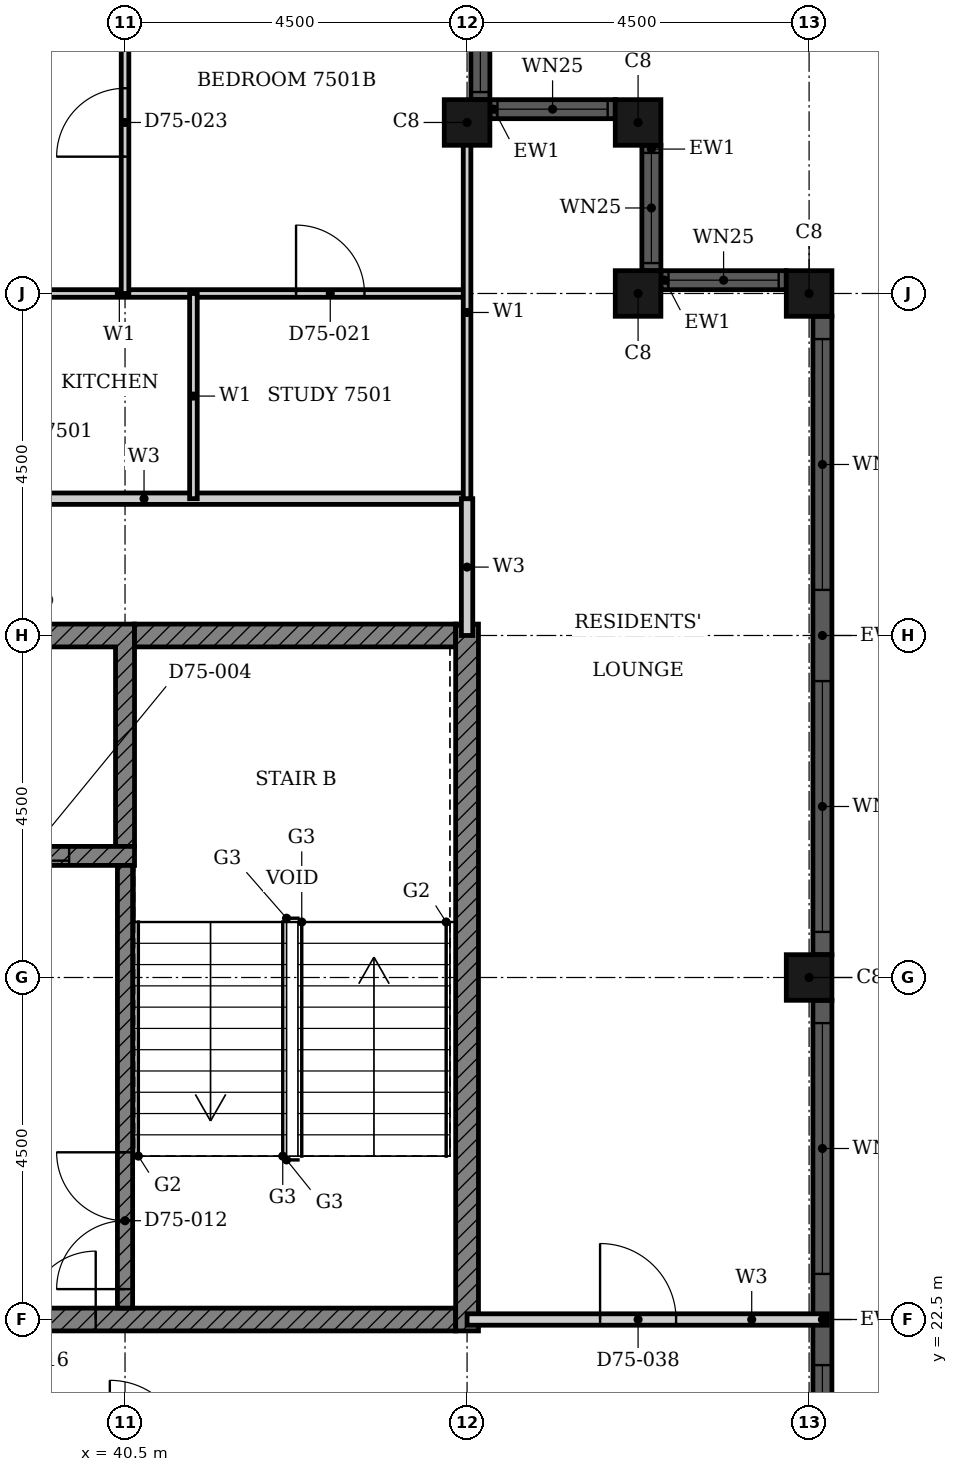
"""IFC4 building model, lengths in metres.
Left out: names, types, materials, properties, quantities, classifications, styles, units other than length and angle.
Written with IfcOpenShell. Run it as: python <this file> out.ifc"""

import sys

from ifc_helpers import new_model, si_unit, direction, frame, frame_2d, origin, origin_2d, place, context, subcontext, project, spatial, polyline, rectangle, hollow_rectangle, outline, extrude, element, fill, save


model = new_model("IFC4")
c1 = context("Model", 3, precision=1e-05, world=origin(), true_north=direction((0.0, 1.0)))
c2 = subcontext(c1, "Body", "Model", "MODEL_VIEW")
j1 = project(units=[si_unit("LENGTHUNIT", "METRE"), si_unit("PLANEANGLEUNIT", "RADIAN")], contexts=[c1])
p1 = place(None, origin())
s1 = spatial("IfcSite", under=j1, at=p1, CompositionType="ELEMENT")
p2 = place(p1, origin())
s2 = spatial("IfcBuilding", under=s1, at=p2, CompositionType="ELEMENT")
p3 = place(p2, frame((0.0, 0.0, 294.5)))
s3 = spatial("IfcBuildingStorey", under=s2, at=p3, CompositionType="ELEMENT", Elevation=294.5)
for number, where, z_axis, x_axis in (
    (1, (49.5, 27.0, 0.0), (0.0, 0.0, 1.0), (1.0, 0.0, 0.0)),
    (2, (49.5, 36.0, 0.0), (0.0, 0.0, 1.0), (1.0, 0.0, 0.0)),
    (3, (47.25, 36.0, 0.0), (0.0, 0.0, 1.0), (1.0, 0.0, 0.0)),
    (4, (47.25, 38.25, 0.0), (0.0, 0.0, 1.0), (1.0, 0.0, 0.0)),
    (5, (45.0, 38.25, 0.0), (0.0, 0.0, 1.0), (1.0, 0.0, 0.0)),
):
    element("IfcColumn", number, at=place(p3, frame(where, z_axis=z_axis, x_axis=x_axis)), inside=s3, PredefinedType="COLUMN", context=c2, shape_type="SweptSolid", body=[
        extrude(hollow_rectangle(XDim=0.6, YDim=0.6, WallThickness=0.02, at=origin_2d()), origin(), (0.0, 0.0, 1.0), 3.7),
    ])
p4 = place(p3, frame((49.675, 18.3, 0.0), z_axis=(0.0, 0.0, 1.0), x_axis=(0.0, 1.0, 0.0)))
e6 = element("IfcWall", 6, at=p4, inside=s3, PredefinedType="SOLIDWALL", context=c2, shape_type="SweptSolid", body=[
    extrude(rectangle(XDim=8.4, YDim=0.25, at=frame_2d((4.2, 0.0))), origin(), (0.0, 0.0, 1.0), 3.7),
])
p5 = place(p4, frame((0.3, 0.0, 0.45)))
e7 = element("IfcOpeningElement", 7, at=p5, cuts=e6, PredefinedType="OPENING", context=c2, shape_type="SweptSolid", body=[
    extrude(rectangle(XDim=3.3, YDim=2.3, at=frame_2d((1.65, 1.15))), frame((0.0, 0.135, 0.0), z_axis=(0.0, -1.0, 0.0), x_axis=(1.0, 0.0, 0.0)), (0.0, 0.0, 1.0), 0.27),
])
p6 = place(p4, frame((4.8, 0.0, 0.45)))
e8 = element("IfcOpeningElement", 8, at=p6, cuts=e6, PredefinedType="OPENING", context=c2, shape_type="SweptSolid", body=[
    extrude(rectangle(XDim=3.3, YDim=2.3, at=frame_2d((1.65, 1.15))), frame((0.0, 0.135, 0.0), z_axis=(0.0, -1.0, 0.0), x_axis=(1.0, 0.0, 0.0)), (0.0, 0.0, 1.0), 0.27),
])
p7 = place(p3, frame((49.675, 27.3, 0.0), z_axis=(0.0, 0.0, 1.0), x_axis=(0.0, 1.0, 0.0)))
e9 = element("IfcWall", 9, at=p7, inside=s3, PredefinedType="SOLIDWALL", context=c2, shape_type="SweptSolid", body=[
    extrude(rectangle(XDim=8.4, YDim=0.25, at=frame_2d((4.2, 0.0))), origin(), (0.0, 0.0, 1.0), 3.7),
])
p8 = place(p7, frame((0.3, 0.0, 0.45)))
e10 = element("IfcOpeningElement", 10, at=p8, cuts=e9, PredefinedType="OPENING", context=c2, shape_type="SweptSolid", body=[
    extrude(rectangle(XDim=3.3, YDim=2.3, at=frame_2d((1.65, 1.15))), frame((0.0, 0.135, 0.0), z_axis=(0.0, -1.0, 0.0), x_axis=(1.0, 0.0, 0.0)), (0.0, 0.0, 1.0), 0.27),
])
p9 = place(p7, frame((4.8, 0.0, 0.45)))
e11 = element("IfcOpeningElement", 11, at=p9, cuts=e9, PredefinedType="OPENING", context=c2, shape_type="SweptSolid", body=[
    extrude(rectangle(XDim=3.3, YDim=2.3, at=frame_2d((1.65, 1.15))), frame((0.0, 0.135, 0.0), z_axis=(0.0, -1.0, 0.0), x_axis=(1.0, 0.0, 0.0)), (0.0, 0.0, 1.0), 0.27),
])
p10 = place(p3, frame((49.2, 36.175, 0.0), z_axis=(0.0, 0.0, 1.0), x_axis=(-1.0, 0.0, 0.0)))
e12 = element("IfcWall", 12, at=p10, inside=s3, PredefinedType="SOLIDWALL", context=c2, shape_type="SweptSolid", body=[
    extrude(rectangle(XDim=1.65, YDim=0.25, at=frame_2d((0.825, 0.0))), origin(), (0.0, 0.0, 1.0), 3.7),
])
p11 = place(p10, frame((0.1, 0.0, 0.9)))
e13 = element("IfcOpeningElement", 13, at=p11, cuts=e12, PredefinedType="OPENING", context=c2, shape_type="SweptSolid", body=[
    extrude(rectangle(XDim=1.45, YDim=1.85, at=frame_2d((0.725, 0.925))), frame((0.0, 0.135, 0.0), z_axis=(0.0, -1.0, 0.0), x_axis=(1.0, 0.0, 0.0)), (0.0, 0.0, 1.0), 0.27),
])
p12 = place(p3, frame((47.425, 36.3, 0.0), z_axis=(0.0, 0.0, 1.0), x_axis=(0.0, 1.0, 0.0)))
e14 = element("IfcWall", 14, at=p12, inside=s3, PredefinedType="SOLIDWALL", context=c2, shape_type="SweptSolid", body=[
    extrude(rectangle(XDim=1.65, YDim=0.25, at=frame_2d((0.825, 0.0))), origin(), (0.0, 0.0, 1.0), 3.7),
])
p13 = place(p12, frame((0.1, 0.0, 0.9)))
e15 = element("IfcOpeningElement", 15, at=p13, cuts=e14, PredefinedType="OPENING", context=c2, shape_type="SweptSolid", body=[
    extrude(rectangle(XDim=1.45, YDim=1.85, at=frame_2d((0.725, 0.925))), frame((0.0, 0.135, 0.0), z_axis=(0.0, -1.0, 0.0), x_axis=(1.0, 0.0, 0.0)), (0.0, 0.0, 1.0), 0.27),
])
p14 = place(p3, frame((46.95, 38.425, 0.0), z_axis=(0.0, 0.0, 1.0), x_axis=(-1.0, 0.0, 0.0)))
e16 = element("IfcWall", 16, at=p14, inside=s3, PredefinedType="SOLIDWALL", context=c2, shape_type="SweptSolid", body=[
    extrude(rectangle(XDim=1.65, YDim=0.25, at=frame_2d((0.825, 0.0))), origin(), (0.0, 0.0, 1.0), 3.7),
])
p15 = place(p14, frame((0.1, 0.0, 0.9)))
e17 = element("IfcOpeningElement", 17, at=p15, cuts=e16, PredefinedType="OPENING", context=c2, shape_type="SweptSolid", body=[
    extrude(rectangle(XDim=1.45, YDim=1.85, at=frame_2d((0.725, 0.925))), frame((0.0, 0.135, 0.0), z_axis=(0.0, -1.0, 0.0), x_axis=(1.0, 0.0, 0.0)), (0.0, 0.0, 1.0), 0.27),
])
p16 = place(p3, frame((45.175, 38.55, 0.0), z_axis=(0.0, 0.0, 1.0), x_axis=(0.0, 1.0, 0.0)))
e18 = element("IfcWall", 18, at=p16, inside=s3, PredefinedType="SOLIDWALL", context=c2, shape_type="SweptSolid", body=[
    extrude(rectangle(XDim=1.65, YDim=0.25, at=frame_2d((0.825, 0.0))), origin(), (0.0, 0.0, 1.0), 3.7),
])
p17 = place(p16, frame((0.1, 0.0, 0.9)))
e19 = element("IfcOpeningElement", 19, at=p17, cuts=e18, PredefinedType="OPENING", context=c2, shape_type="SweptSolid", body=[
    extrude(rectangle(XDim=1.45, YDim=1.85, at=frame_2d((0.725, 0.925))), frame((0.0, 0.135, 0.0), z_axis=(0.0, -1.0, 0.0), x_axis=(1.0, 0.0, 0.0)), (0.0, 0.0, 1.0), 0.27),
])
p18 = place(p3, origin())
e20 = element("IfcWall", 20, at=p18, inside=s3, PredefinedType="SHEAR", context=c2, shape_type="SweptSolid", body=[
    extrude(outline(polyline([(37.803, 28.725), (38.053, 28.725), (38.053, 31.35), (40.375, 31.35), (40.375, 28.725), (40.625, 28.725), (40.625, 31.65), (37.803, 31.65), (37.803, 28.725)])), origin(), (0.0, 0.0, 1.0), 3.4),
])
p19 = place(p3, frame((30.339, 22.5, 0.0), z_axis=(0.0, 0.0, 1.0), x_axis=(1.0, 0.0, 0.0)))
e21 = element("IfcWall", 21, at=p19, inside=s3, PredefinedType="SHEAR", context=c2, shape_type="SweptSolid", body=[
    extrude(rectangle(XDim=14.511, YDim=0.3, at=frame_2d((7.255, 0.0))), origin(), (0.0, 0.0, 1.0), 3.4),
])
p20 = place(p19, frame((7.975, 0.0, 0.0)))
e22 = element("IfcOpeningElement", 22, at=p20, cuts=e21, PredefinedType="OPENING", context=c2, shape_type="SweptSolid", body=[
    extrude(rectangle(XDim=1.8, YDim=2.1, at=frame_2d((0.9, 1.05))), frame((0.0, 0.16, 0.0), z_axis=(0.0, -1.0, 0.0), x_axis=(1.0, 0.0, 0.0)), (0.0, 0.0, 1.0), 0.32),
])
p21 = place(p3, frame((40.625, 31.5, 0.0), z_axis=(0.0, 0.0, 1.0), x_axis=(1.0, 0.0, 0.0)))
e23 = element("IfcWall", 23, at=p21, inside=s3, PredefinedType="SHEAR", context=c2, shape_type="SweptSolid", body=[
    extrude(rectangle(XDim=4.225, YDim=0.3, at=frame_2d((2.113, 0.0))), origin(), (0.0, 0.0, 1.0), 3.4),
])
p22 = place(p3, frame((45.0, 22.35, 0.0), z_axis=(0.0, 0.0, 1.0), x_axis=(0.0, 1.0, 0.0)))
e24 = element("IfcWall", 24, at=p22, inside=s3, PredefinedType="SHEAR", context=c2, shape_type="SweptSolid", body=[
    extrude(rectangle(XDim=9.3, YDim=0.3, at=frame_2d((4.65, 0.0))), origin(), (0.0, 0.0, 1.0), 3.4),
])
p23 = place(p3, frame((24.947, 28.6, 0.0), z_axis=(0.0, 0.0, 1.0), x_axis=(1.0, 0.0, 0.0)))
e25 = element("IfcWall", 25, at=p23, inside=s3, PredefinedType="SHEAR", context=c2, shape_type="SweptSolid", body=[
    extrude(rectangle(XDim=15.678, YDim=0.25, at=frame_2d((7.839, 0.0))), origin(), (0.0, 0.0, 1.0), 3.4),
])
p24 = place(p23, frame((3.432, 0.0, 0.0)))
e26 = element("IfcOpeningElement", 26, at=p24, cuts=e25, PredefinedType="OPENING", context=c2, shape_type="SweptSolid", body=[
    extrude(rectangle(XDim=1.1, YDim=2.1, at=frame_2d((0.55, 1.05))), frame((0.0, 0.135, 0.0), z_axis=(0.0, -1.0, 0.0), x_axis=(1.0, 0.0, 0.0)), (0.0, 0.0, 1.0), 0.27),
])
p25 = place(p23, frame((13.718, 0.0, 0.0)))
e27 = element("IfcOpeningElement", 27, at=p25, cuts=e25, PredefinedType="OPENING", context=c2, shape_type="SweptSolid", body=[
    extrude(rectangle(XDim=1.1, YDim=2.1, at=frame_2d((0.55, 1.05))), frame((0.0, 0.135, 0.0), z_axis=(0.0, -1.0, 0.0), x_axis=(1.0, 0.0, 0.0)), (0.0, 0.0, 1.0), 0.27),
])
p26 = place(p23, frame((0.961, 0.0, 0.0)))
e28 = element("IfcOpeningElement", 28, at=p26, cuts=e25, PredefinedType="OPENING", context=c2, shape_type="SweptSolid", body=[
    extrude(rectangle(XDim=0.9, YDim=2.1, at=frame_2d((0.45, 1.05))), frame((0.0, 0.135, 0.0), z_axis=(0.0, -1.0, 0.0), x_axis=(1.0, 0.0, 0.0)), (0.0, 0.0, 1.0), 0.27),
])
p27 = place(p23, frame((7.389, 0.0, 0.0)))
e29 = element("IfcOpeningElement", 29, at=p27, cuts=e25, PredefinedType="OPENING", context=c2, shape_type="SweptSolid", body=[
    extrude(rectangle(XDim=0.9, YDim=2.1, at=frame_2d((0.45, 1.05))), frame((0.0, 0.135, 0.0), z_axis=(0.0, -1.0, 0.0), x_axis=(1.0, 0.0, 0.0)), (0.0, 0.0, 1.0), 0.27),
])
p28 = place(p23, frame((11.246, 0.0, 0.0)))
e30 = element("IfcOpeningElement", 30, at=p28, cuts=e25, PredefinedType="OPENING", context=c2, shape_type="SweptSolid", body=[
    extrude(rectangle(XDim=0.9, YDim=2.1, at=frame_2d((0.45, 1.05))), frame((0.0, 0.135, 0.0), z_axis=(0.0, -1.0, 0.0), x_axis=(1.0, 0.0, 0.0)), (0.0, 0.0, 1.0), 0.27),
])
p29 = place(p3, frame((40.5, 22.65, 0.0), z_axis=(0.0, 0.0, 1.0), x_axis=(0.0, 1.0, 0.0)))
e31 = element("IfcWall", 31, at=p29, inside=s3, PredefinedType="SHEAR", context=c2, shape_type="SweptSolid", body=[
    extrude(rectangle(XDim=5.825, YDim=0.2, at=frame_2d((2.913, 0.0))), origin(), (0.0, 0.0, 1.0), 3.4),
])
p30 = place(p29, frame((0.25, 0.0, 0.0)))
e32 = element("IfcOpeningElement", 32, at=p30, cuts=e31, PredefinedType="OPENING", context=c2, shape_type="SweptSolid", body=[
    extrude(rectangle(XDim=1.8, YDim=2.1, at=frame_2d((0.9, 1.05))), frame((0.0, 0.11, 0.0), z_axis=(0.0, -1.0, 0.0), x_axis=(1.0, 0.0, 0.0)), (0.0, 0.0, 1.0), 0.22),
])
p31 = place(p3, frame((45.0, 22.5, 0.0), z_axis=(0.0, 0.0, 1.0), x_axis=(1.0, 0.0, 0.0)))
e33 = element("IfcWall", 33, at=p31, inside=s3, PredefinedType="PARTITIONING", context=c2, shape_type="SweptSolid", body=[
    extrude(rectangle(XDim=4.74, YDim=0.15, at=frame_2d((2.37, 0.0))), origin(), (0.0, 0.0, 1.0), 3.4),
])
p32 = place(p31, frame((1.75, 0.0, 0.0)))
e34 = element("IfcOpeningElement", 34, at=p32, cuts=e33, PredefinedType="OPENING", context=c2, shape_type="SweptSolid", body=[
    extrude(rectangle(XDim=1.0, YDim=2.1, at=frame_2d((0.5, 1.05))), frame((0.0, 0.085, 0.0), z_axis=(0.0, -1.0, 0.0), x_axis=(1.0, 0.0, 0.0)), (0.0, 0.0, 1.0), 0.17),
])
p33 = place(p3, frame((33.9, 33.3, 0.0), z_axis=(0.0, 0.0, 1.0), x_axis=(1.0, 0.0, 0.0)))
e35 = element("IfcWall", 35, at=p33, inside=s3, PredefinedType="PARTITIONING", context=c2, shape_type="SweptSolid", body=[
    extrude(rectangle(XDim=11.1, YDim=0.15, at=frame_2d((5.55, 0.0))), origin(), (0.0, 0.0, 1.0), 3.4),
])
p34 = place(p33, frame((1.6, 0.0, 0.0)))
e36 = element("IfcOpeningElement", 36, at=p34, cuts=e35, PredefinedType="OPENING", context=c2, shape_type="SweptSolid", body=[
    extrude(rectangle(XDim=1.0, YDim=2.2, at=frame_2d((0.5, 1.1))), frame((0.0, 0.085, 0.0), z_axis=(0.0, -1.0, 0.0), x_axis=(1.0, 0.0, 0.0)), (0.0, 0.0, 1.0), 0.17),
])
p35 = place(p3, frame((45.0, 31.5, 0.0), z_axis=(0.0, 0.0, 1.0), x_axis=(0.0, 1.0, 0.0)))
e37 = element("IfcWall", 37, at=p35, inside=s3, PredefinedType="PARTITIONING", context=c2, shape_type="SweptSolid", body=[
    extrude(rectangle(XDim=1.8, YDim=0.15, at=frame_2d((0.9, 0.0))), origin(), (0.0, 0.0, 1.0), 3.4),
])
p36 = place(p3, frame((38.1, 36.0, 0.0), z_axis=(0.0, 0.0, 1.0), x_axis=(1.0, 0.0, 0.0)))
e38 = element("IfcWall", 38, at=p36, inside=s3, PredefinedType="PARTITIONING", context=c2, shape_type="SweptSolid", body=[
    extrude(rectangle(XDim=6.9, YDim=0.1, at=frame_2d((3.45, 0.0))), origin(), (0.0, 0.0, 1.0), 3.4),
])
p37 = place(p36, frame((4.65, 0.0, 0.0)))
e39 = element("IfcOpeningElement", 39, at=p37, cuts=e38, PredefinedType="OPENING", context=c2, shape_type="SweptSolid", body=[
    extrude(rectangle(XDim=0.9, YDim=2.1, at=frame_2d((0.45, 1.05))), frame((0.0, 0.06, 0.0), z_axis=(0.0, -1.0, 0.0), x_axis=(1.0, 0.0, 0.0)), (0.0, 0.0, 1.0), 0.12),
])
p38 = place(p3, frame((40.5, 36.0, 0.0), z_axis=(0.0, 0.0, 1.0), x_axis=(0.0, 1.0, 0.0)))
e40 = element("IfcWall", 40, at=p38, inside=s3, PredefinedType="PARTITIONING", context=c2, shape_type="SweptSolid", body=[
    extrude(rectangle(XDim=4.74, YDim=0.1, at=frame_2d((2.37, 0.0))), origin(), (0.0, 0.0, 1.0), 3.4),
])
p39 = place(p38, frame((1.8, 0.0, 0.0)))
e41 = element("IfcOpeningElement", 41, at=p39, cuts=e40, PredefinedType="OPENING", context=c2, shape_type="SweptSolid", body=[
    extrude(rectangle(XDim=0.9, YDim=2.1, at=frame_2d((0.45, 1.05))), frame((0.0, 0.06, 0.0), z_axis=(0.0, -1.0, 0.0), x_axis=(1.0, 0.0, 0.0)), (0.0, 0.0, 1.0), 0.12),
])
p40 = place(p3, frame((41.4, 33.3, 0.0), z_axis=(0.0, 0.0, 1.0), x_axis=(0.0, 1.0, 0.0)))
e42 = element("IfcWall", 42, at=p40, inside=s3, PredefinedType="PARTITIONING", context=c2, shape_type="SweptSolid", body=[
    extrude(rectangle(XDim=2.7, YDim=0.1, at=frame_2d((1.35, 0.0))), origin(), (0.0, 0.0, 1.0), 3.4),
])
p41 = place(p3, frame((45.0, 33.3, 0.0), z_axis=(0.0, 0.0, 1.0), x_axis=(0.0, 1.0, 0.0)))
e43 = element("IfcWall", 43, at=p41, inside=s3, PredefinedType="PARTITIONING", context=c2, shape_type="SweptSolid", body=[
    extrude(rectangle(XDim=4.9, YDim=0.1, at=frame_2d((2.45, 0.0))), origin(), (0.0, 0.0, 1.0), 3.4),
])
p42 = place(p5, origin())
e44 = element("IfcWindow", 44, at=p42, inside=s3, PartitioningType="SINGLE_PANEL", PredefinedType="WINDOW", context=c2, shape_type="SweptSolid", body=[
    extrude(rectangle(XDim=3.3, YDim=2.3, at=frame_2d((1.65, 1.15))), frame((0.0, 0.03, 0.0), z_axis=(0.0, -1.0, 0.0), x_axis=(1.0, 0.0, 0.0)), (0.0, 0.0, 1.0), 0.06),
])
fill(e7, e44)
p43 = place(p6, origin())
e45 = element("IfcWindow", 45, at=p43, inside=s3, PartitioningType="SINGLE_PANEL", PredefinedType="WINDOW", context=c2, shape_type="SweptSolid", body=[
    extrude(rectangle(XDim=3.3, YDim=2.3, at=frame_2d((1.65, 1.15))), frame((0.0, 0.03, 0.0), z_axis=(0.0, -1.0, 0.0), x_axis=(1.0, 0.0, 0.0)), (0.0, 0.0, 1.0), 0.06),
])
fill(e8, e45)
p44 = place(p8, origin())
e46 = element("IfcWindow", 46, at=p44, inside=s3, PartitioningType="SINGLE_PANEL", PredefinedType="WINDOW", context=c2, shape_type="SweptSolid", body=[
    extrude(rectangle(XDim=3.3, YDim=2.3, at=frame_2d((1.65, 1.15))), frame((0.0, 0.03, 0.0), z_axis=(0.0, -1.0, 0.0), x_axis=(1.0, 0.0, 0.0)), (0.0, 0.0, 1.0), 0.06),
])
fill(e10, e46)
p45 = place(p9, origin())
e47 = element("IfcWindow", 47, at=p45, inside=s3, PartitioningType="SINGLE_PANEL", PredefinedType="WINDOW", context=c2, shape_type="SweptSolid", body=[
    extrude(rectangle(XDim=3.3, YDim=2.3, at=frame_2d((1.65, 1.15))), frame((0.0, 0.03, 0.0), z_axis=(0.0, -1.0, 0.0), x_axis=(1.0, 0.0, 0.0)), (0.0, 0.0, 1.0), 0.06),
])
fill(e11, e47)
p46 = place(p11, origin())
e48 = element("IfcWindow", 48, at=p46, inside=s3, PartitioningType="SINGLE_PANEL", PredefinedType="WINDOW", context=c2, shape_type="SweptSolid", body=[
    extrude(rectangle(XDim=1.45, YDim=1.85, at=frame_2d((0.725, 0.925))), frame((0.0, 0.03, 0.0), z_axis=(0.0, -1.0, 0.0), x_axis=(1.0, 0.0, 0.0)), (0.0, 0.0, 1.0), 0.06),
])
fill(e13, e48)
p47 = place(p13, origin())
e49 = element("IfcWindow", 49, at=p47, inside=s3, PartitioningType="SINGLE_PANEL", PredefinedType="WINDOW", context=c2, shape_type="SweptSolid", body=[
    extrude(rectangle(XDim=1.45, YDim=1.85, at=frame_2d((0.725, 0.925))), frame((0.0, 0.03, 0.0), z_axis=(0.0, -1.0, 0.0), x_axis=(1.0, 0.0, 0.0)), (0.0, 0.0, 1.0), 0.06),
])
fill(e15, e49)
p48 = place(p15, origin())
e50 = element("IfcWindow", 50, at=p48, inside=s3, PartitioningType="SINGLE_PANEL", PredefinedType="WINDOW", context=c2, shape_type="SweptSolid", body=[
    extrude(rectangle(XDim=1.45, YDim=1.85, at=frame_2d((0.725, 0.925))), frame((0.0, 0.03, 0.0), z_axis=(0.0, -1.0, 0.0), x_axis=(1.0, 0.0, 0.0)), (0.0, 0.0, 1.0), 0.06),
])
fill(e17, e50)
p49 = place(p17, origin())
e51 = element("IfcWindow", 51, at=p49, inside=s3, PartitioningType="SINGLE_PANEL", PredefinedType="WINDOW", context=c2, shape_type="SweptSolid", body=[
    extrude(rectangle(XDim=1.45, YDim=1.85, at=frame_2d((0.725, 0.925))), frame((0.0, 0.03, 0.0), z_axis=(0.0, -1.0, 0.0), x_axis=(1.0, 0.0, 0.0)), (0.0, 0.0, 1.0), 0.06),
])
fill(e19, e51)
p50 = place(p25, origin())
e52 = element("IfcDoor", 52, at=p50, inside=s3, OperationType="DOUBLE_DOOR_SLIDING", PredefinedType="DOOR", context=c2, shape_type="SweptSolid", body=[
    extrude(rectangle(XDim=1.1, YDim=2.1, at=frame_2d((0.55, 1.05))), frame((0.0, 0.025, 0.0), z_axis=(0.0, -1.0, 0.0), x_axis=(1.0, 0.0, 0.0)), (0.0, 0.0, 1.0), 0.05),
])
fill(e27, e52)
p51 = place(p30, origin())
e53 = element("IfcDoor", 53, at=p51, inside=s3, OperationType="DOUBLE_DOOR_SINGLE_SWING", PredefinedType="DOOR", context=c2, shape_type="SweptSolid", body=[
    extrude(rectangle(XDim=1.8, YDim=2.1, at=frame_2d((0.9, 1.05))), frame((0.0, 0.025, 0.0), z_axis=(0.0, -1.0, 0.0), x_axis=(1.0, 0.0, 0.0)), (0.0, 0.0, 1.0), 0.05),
])
fill(e32, e53)
p52 = place(p20, origin())
e54 = element("IfcDoor", 54, at=p52, inside=s3, OperationType="DOUBLE_DOOR_SINGLE_SWING", PredefinedType="DOOR", context=c2, shape_type="SweptSolid", body=[
    extrude(rectangle(XDim=1.8, YDim=2.1, at=frame_2d((0.9, 1.05))), frame((0.0, 0.025, 0.0), z_axis=(0.0, -1.0, 0.0), x_axis=(1.0, 0.0, 0.0)), (0.0, 0.0, 1.0), 0.05),
])
fill(e22, e54)
p53 = place(p37, origin())
e55 = element("IfcDoor", 55, at=p53, inside=s3, OperationType="SINGLE_SWING_LEFT", PredefinedType="DOOR", context=c2, shape_type="SweptSolid", body=[
    extrude(rectangle(XDim=0.9, YDim=2.1, at=frame_2d((0.45, 1.05))), frame((0.0, 0.025, 0.0), z_axis=(0.0, -1.0, 0.0), x_axis=(1.0, 0.0, 0.0)), (0.0, 0.0, 1.0), 0.05),
])
fill(e39, e55)
p54 = place(p39, origin())
e56 = element("IfcDoor", 56, at=p54, inside=s3, OperationType="SINGLE_SWING_LEFT", PredefinedType="DOOR", context=c2, shape_type="SweptSolid", body=[
    extrude(rectangle(XDim=0.9, YDim=2.1, at=frame_2d((0.45, 1.05))), frame((0.0, 0.025, 0.0), z_axis=(0.0, -1.0, 0.0), x_axis=(1.0, 0.0, 0.0)), (0.0, 0.0, 1.0), 0.05),
])
fill(e41, e56)
p55 = place(p32, origin())
e57 = element("IfcDoor", 57, at=p55, inside=s3, OperationType="SINGLE_SWING_RIGHT", PredefinedType="DOOR", context=c2, shape_type="SweptSolid", body=[
    extrude(rectangle(XDim=1.0, YDim=2.1, at=frame_2d((0.5, 1.05))), frame((0.0, 0.025, 0.0), z_axis=(0.0, -1.0, 0.0), x_axis=(1.0, 0.0, 0.0)), (0.0, 0.0, 1.0), 0.05),
])
fill(e34, e57)
save(model, sys.argv[1])
